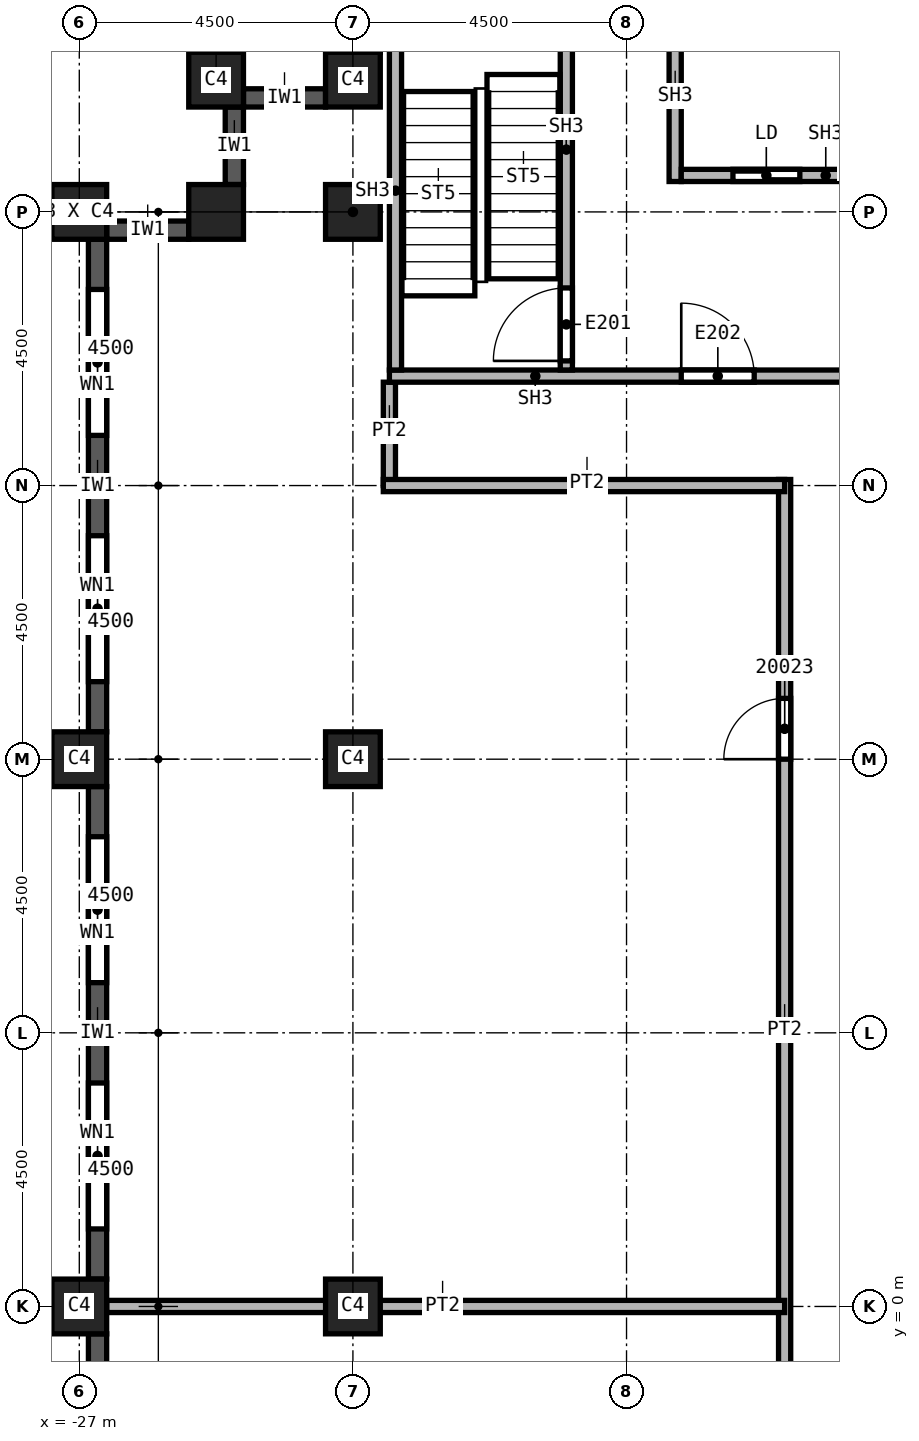
"""IFC4 building model, lengths in metres.
Left out: names, types, materials, properties, quantities, classifications, styles, units other than length and angle.
Written with IfcOpenShell. Run it as: python <this file> out.ifc"""

import sys

from ifc_helpers import new_model, si_unit, direction, frame, frame_2d, origin, origin_2d, place, context, subcontext, project, spatial, rectangle, extrude, element, fill, save


model = new_model("IFC4")
c1 = context("Model", 3, precision=1e-05, world=origin(), true_north=direction((0.0, 1.0)))
c2 = subcontext(c1, "Body", "Model", "MODEL_VIEW")
j1 = project(units=[si_unit("LENGTHUNIT", "METRE"), si_unit("PLANEANGLEUNIT", "RADIAN")], contexts=[c1])
p1 = place(None, origin())
s1 = spatial("IfcSite", under=j1, at=p1, CompositionType="ELEMENT")
p2 = place(p1, origin())
s2 = spatial("IfcBuilding", under=s1, at=p2, CompositionType="ELEMENT")
p3 = place(p2, frame((0.0, 0.0, 286.0)))
s3 = spatial("IfcBuildingStorey", under=s2, at=p3, CompositionType="ELEMENT", Elevation=286.0)
for number, where, z_axis, x_axis in (
    (1, (-22.5, 0.0, 0.0), (0.0, 0.0, 1.0), (1.0, 0.0, 0.0)),
    (2, (-22.5, 9.0, 0.0), (0.0, 0.0, 1.0), (1.0, 0.0, 0.0)),
    (3, (-22.5, 18.0, 0.0), (0.0, 0.0, 1.0), (1.0, 0.0, 0.0)),
    (4, (-27.0, 0.0, 0.0), (0.0, 0.0, 1.0), (0.0, 1.0, 0.0)),
    (5, (-27.0, 9.0, 0.0), (0.0, 0.0, 1.0), (0.0, 1.0, 0.0)),
    (6, (-27.0, 18.0, 0.0), (0.0, 0.0, 1.0), (0.0, 1.0, 0.0)),
    (7, (-22.5, 20.175, 0.0), (0.0, 0.0, 1.0), (1.0, 0.0, 0.0)),
    (8, (-24.75, 20.175, 0.0), (0.0, 0.0, 1.0), (1.0, 0.0, 0.0)),
    (9, (-24.75, 18.0, 0.0), (0.0, 0.0, 1.0), (1.0, 0.0, 0.0)),
):
    element("IfcColumn", number, at=place(p3, frame(where, z_axis=z_axis, x_axis=x_axis)), inside=s3, PredefinedType="COLUMN", context=c2, shape_type="SweptSolid", body=[
        extrude(rectangle(XDim=0.9, YDim=0.9, at=origin_2d()), origin(), (0.0, 0.0, 1.0), 3.72),
    ])
p4 = place(p3, frame((-24.45, 19.725, 0.0), z_axis=(0.0, 0.0, 1.0), x_axis=(0.0, -1.0, 0.0)))
e10 = element("IfcWall", 10, at=p4, inside=s3, PredefinedType="SOLIDWALL", context=c2, shape_type="SweptSolid", body=[
    extrude(rectangle(XDim=1.275, YDim=0.3, at=frame_2d((0.638, 0.0))), origin(), (0.0, 0.0, 1.0), 3.12),
])
p5 = place(p3, frame((-25.2, 17.7, 0.0), z_axis=(0.0, 0.0, 1.0), x_axis=(-1.0, 0.0, 0.0)))
e11 = element("IfcWall", 11, at=p5, inside=s3, PredefinedType="SOLIDWALL", context=c2, shape_type="SweptSolid", body=[
    extrude(rectangle(XDim=1.35, YDim=0.3, at=frame_2d((0.675, 0.0))), origin(), (0.0, 0.0, 1.0), 3.12),
])
p6 = place(p3, frame((-26.7, 17.55, 0.0), z_axis=(0.0, 0.0, 1.0), x_axis=(0.0, -1.0, 0.0)))
e12 = element("IfcWall", 12, at=p6, inside=s3, PredefinedType="SOLIDWALL", context=c2, shape_type="SweptSolid", body=[
    extrude(rectangle(XDim=8.1, YDim=0.3, at=frame_2d((4.05, 0.0))), origin(), (0.0, 0.0, 1.0), 3.12),
])
p7 = place(p6, frame((0.825, 0.0, 0.8)))
e13 = element("IfcOpeningElement", 13, at=p7, cuts=e12, PredefinedType="OPENING", context=c2, shape_type="SweptSolid", body=[
    extrude(rectangle(XDim=2.4, YDim=1.95, at=frame_2d((1.2, 0.975))), frame((0.0, 0.15, 0.0), z_axis=(0.0, -1.0, 0.0), x_axis=(1.0, 0.0, 0.0)), (0.0, 0.0, 1.0), 0.3),
])
p8 = place(p6, frame((4.875, 0.0, 0.8)))
e14 = element("IfcOpeningElement", 14, at=p8, cuts=e12, PredefinedType="OPENING", context=c2, shape_type="SweptSolid", body=[
    extrude(rectangle(XDim=2.4, YDim=1.95, at=frame_2d((1.2, 0.975))), frame((0.0, 0.15, 0.0), z_axis=(0.0, -1.0, 0.0), x_axis=(1.0, 0.0, 0.0)), (0.0, 0.0, 1.0), 0.3),
])
p9 = place(p3, frame((-26.7, 8.55, 0.0), z_axis=(0.0, 0.0, 1.0), x_axis=(0.0, -1.0, 0.0)))
e15 = element("IfcWall", 15, at=p9, inside=s3, PredefinedType="SOLIDWALL", context=c2, shape_type="SweptSolid", body=[
    extrude(rectangle(XDim=8.1, YDim=0.3, at=frame_2d((4.05, 0.0))), origin(), (0.0, 0.0, 1.0), 3.12),
])
p10 = place(p9, frame((0.825, 0.0, 0.8)))
e16 = element("IfcOpeningElement", 16, at=p10, cuts=e15, PredefinedType="OPENING", context=c2, shape_type="SweptSolid", body=[
    extrude(rectangle(XDim=2.4, YDim=1.95, at=frame_2d((1.2, 0.975))), frame((0.0, 0.15, 0.0), z_axis=(0.0, -1.0, 0.0), x_axis=(1.0, 0.0, 0.0)), (0.0, 0.0, 1.0), 0.3),
])
p11 = place(p9, frame((4.875, 0.0, 0.8)))
e17 = element("IfcOpeningElement", 17, at=p11, cuts=e15, PredefinedType="OPENING", context=c2, shape_type="SweptSolid", body=[
    extrude(rectangle(XDim=2.4, YDim=1.95, at=frame_2d((1.2, 0.975))), frame((0.0, 0.15, 0.0), z_axis=(0.0, -1.0, 0.0), x_axis=(1.0, 0.0, 0.0)), (0.0, 0.0, 1.0), 0.3),
])
p12 = place(p3, frame((-26.7, -0.45, 0.0), z_axis=(0.0, 0.0, 1.0), x_axis=(0.0, -1.0, 0.0)))
e18 = element("IfcWall", 18, at=p12, inside=s3, PredefinedType="SOLIDWALL", context=c2, shape_type="SweptSolid", body=[
    extrude(rectangle(XDim=8.1, YDim=0.3, at=frame_2d((4.05, 0.0))), origin(), (0.0, 0.0, 1.0), 3.12),
])
p13 = place(p12, frame((0.825, 0.0, 0.8)))
e19 = element("IfcOpeningElement", 19, at=p13, cuts=e18, PredefinedType="OPENING", context=c2, shape_type="SweptSolid", body=[
    extrude(rectangle(XDim=2.4, YDim=1.95, at=frame_2d((1.2, 0.975))), frame((0.0, 0.15, 0.0), z_axis=(0.0, -1.0, 0.0), x_axis=(1.0, 0.0, 0.0)), (0.0, 0.0, 1.0), 0.3),
])
p14 = place(p12, frame((4.875, 0.0, 0.8)))
e20 = element("IfcOpeningElement", 20, at=p14, cuts=e18, PredefinedType="OPENING", context=c2, shape_type="SweptSolid", body=[
    extrude(rectangle(XDim=2.4, YDim=1.95, at=frame_2d((1.2, 0.975))), frame((0.0, 0.15, 0.0), z_axis=(0.0, -1.0, 0.0), x_axis=(1.0, 0.0, 0.0)), (0.0, 0.0, 1.0), 0.3),
])
p15 = place(p3, frame((-22.95, 19.875, 0.0), z_axis=(0.0, 0.0, 1.0), x_axis=(-1.0, 0.0, 0.0)))
e21 = element("IfcWall", 21, at=p15, inside=s3, PredefinedType="SOLIDWALL", context=c2, shape_type="SweptSolid", body=[
    extrude(rectangle(XDim=1.35, YDim=0.3, at=frame_2d((0.675, 0.0))), origin(), (0.0, 0.0, 1.0), 3.12),
])
p16 = place(p3, frame((-21.9, 13.5, 0.0), z_axis=(0.0, 0.0, 1.0), x_axis=(0.0, 1.0, 0.0)))
e22 = element("IfcWall", 22, at=p16, inside=s3, PredefinedType="PARTITIONING", context=c2, shape_type="SweptSolid", body=[
    extrude(rectangle(XDim=1.7, YDim=0.2, at=frame_2d((0.85, 0.0))), origin(), (0.0, 0.0, 1.0), 3.72),
])
p17 = place(p3, frame((-15.4, -21.9, 0.0), z_axis=(0.0, 0.0, 1.0), x_axis=(0.0, 1.0, 0.0)))
e23 = element("IfcWall", 23, at=p17, inside=s3, PredefinedType="PARTITIONING", context=c2, shape_type="SweptSolid", body=[
    extrude(rectangle(XDim=35.5, YDim=0.2, at=frame_2d((17.75, 0.0))), origin(), (0.0, 0.0, 1.0), 3.72),
])
p18 = place(p17, frame((30.9, 0.0, 0.0)))
e24 = element("IfcOpeningElement", 24, at=p18, cuts=e23, PredefinedType="OPENING", context=c2, shape_type="SweptSolid", body=[
    extrude(rectangle(XDim=1.0, YDim=2.1, at=frame_2d((0.5, 1.05))), frame((0.0, 0.1, 0.0), z_axis=(0.0, -1.0, 0.0), x_axis=(1.0, 0.0, 0.0)), (0.0, 0.0, 1.0), 0.2),
])
p19 = place(p17, frame((2.65, 0.0, 0.0)))
e25 = element("IfcOpeningElement", 25, at=p19, cuts=e23, PredefinedType="OPENING", context=c2, shape_type="SweptSolid", body=[
    extrude(rectangle(XDim=1.0, YDim=2.1, at=frame_2d((0.5, 1.05))), frame((0.0, 0.1, 0.0), z_axis=(0.0, -1.0, 0.0), x_axis=(1.0, 0.0, 0.0)), (0.0, 0.0, 1.0), 0.2),
])
p20 = place(p17, frame((7.65, 0.0, 0.0)))
e26 = element("IfcOpeningElement", 26, at=p20, cuts=e23, PredefinedType="OPENING", context=c2, shape_type="SweptSolid", body=[
    extrude(rectangle(XDim=1.0, YDim=2.1, at=frame_2d((0.5, 1.05))), frame((0.0, 0.1, 0.0), z_axis=(0.0, -1.0, 0.0), x_axis=(1.0, 0.0, 0.0)), (0.0, 0.0, 1.0), 0.2),
])
p21 = place(p17, frame((14.7, 0.0, 0.0)))
e27 = element("IfcOpeningElement", 27, at=p21, cuts=e23, PredefinedType="OPENING", context=c2, shape_type="SweptSolid", body=[
    extrude(rectangle(XDim=1.0, YDim=2.1, at=frame_2d((0.5, 1.05))), frame((0.0, 0.1, 0.0), z_axis=(0.0, -1.0, 0.0), x_axis=(1.0, 0.0, 0.0)), (0.0, 0.0, 1.0), 0.2),
])
p22 = place(p17, frame((18.3, 0.0, 0.0)))
e28 = element("IfcOpeningElement", 28, at=p22, cuts=e23, PredefinedType="OPENING", context=c2, shape_type="SweptSolid", body=[
    extrude(rectangle(XDim=1.0, YDim=2.1, at=frame_2d((0.5, 1.05))), frame((0.0, 0.1, 0.0), z_axis=(0.0, -1.0, 0.0), x_axis=(1.0, 0.0, 0.0)), (0.0, 0.0, 1.0), 0.2),
])
p23 = place(p3, frame((-15.4, 0.0, 0.0), z_axis=(0.0, 0.0, 1.0), x_axis=(-1.0, 0.0, 0.0)))
e29 = element("IfcWall", 29, at=p23, inside=s3, PredefinedType="PARTITIONING", context=c2, shape_type="SweptSolid", body=[
    extrude(rectangle(XDim=11.15, YDim=0.2, at=frame_2d((5.575, 0.0))), origin(), (0.0, 0.0, 1.0), 3.72),
])
p24 = place(p3, frame((-15.4, 13.5, 0.0), z_axis=(0.0, 0.0, 1.0), x_axis=(-1.0, 0.0, 0.0)))
e30 = element("IfcWall", 30, at=p24, inside=s3, PredefinedType="PARTITIONING", context=c2, shape_type="SweptSolid", body=[
    extrude(rectangle(XDim=6.6, YDim=0.2, at=frame_2d((3.3, 0.0))), origin(), (0.0, 0.0, 1.0), 3.72),
])
p25 = place(p3, frame((-21.9, 15.3, 0.0), z_axis=(0.0, 0.0, 1.0), x_axis=(1.0, 0.0, 0.0)))
e31 = element("IfcWall", 31, at=p25, inside=s3, PredefinedType="SOLIDWALL", context=c2, shape_type="SweptSolid", body=[
    extrude(rectangle(XDim=8.275, YDim=0.2, at=frame_2d((4.137, 0.0))), origin(), (0.0, 0.0, 1.0), 3.72),
])
p26 = place(p25, frame((4.8, 0.0, 0.0)))
e32 = element("IfcOpeningElement", 32, at=p26, cuts=e31, PredefinedType="OPENING", context=c2, shape_type="SweptSolid", body=[
    extrude(rectangle(XDim=1.2, YDim=2.1, at=frame_2d((0.6, 1.05))), frame((0.0, 0.1, 0.0), z_axis=(0.0, -1.0, 0.0), x_axis=(1.0, 0.0, 0.0)), (0.0, 0.0, 1.0), 0.2),
])
p27 = place(p3, frame((-21.8, 15.4, 0.0), z_axis=(0.0, 0.0, 1.0), x_axis=(0.0, 1.0, 0.0)))
e33 = element("IfcWall", 33, at=p27, inside=s3, PredefinedType="SOLIDWALL", context=c2, shape_type="SweptSolid", body=[
    extrude(rectangle(XDim=5.9, YDim=0.2, at=frame_2d((2.95, 0.0))), origin(), (0.0, 0.0, 1.0), 3.72),
])
p28 = place(p3, frame((-18.99, 15.4, 0.0), z_axis=(0.0, 0.0, 1.0), x_axis=(0.0, 1.0, 0.0)))
e34 = element("IfcWall", 34, at=p28, inside=s3, PredefinedType="SOLIDWALL", context=c2, shape_type="SweptSolid", body=[
    extrude(rectangle(XDim=5.9, YDim=0.2, at=frame_2d((2.95, 0.0))), origin(), (0.0, 0.0, 1.0), 3.72),
])
p29 = place(p28, frame((0.15, 0.0, 0.0)))
e35 = element("IfcOpeningElement", 35, at=p29, cuts=e34, PredefinedType="OPENING", context=c2, shape_type="SweptSolid", body=[
    extrude(rectangle(XDim=1.2, YDim=2.1, at=frame_2d((0.6, 1.05))), frame((0.0, 0.1, 0.0), z_axis=(0.0, -1.0, 0.0), x_axis=(1.0, 0.0, 0.0)), (0.0, 0.0, 1.0), 0.2),
])
p30 = place(p3, frame((-17.2, 18.5, 0.0), z_axis=(0.0, 0.0, 1.0), x_axis=(0.0, 1.0, 0.0)))
e36 = element("IfcWall", 36, at=p30, inside=s3, PredefinedType="SOLIDWALL", context=c2, shape_type="SweptSolid", body=[
    extrude(rectangle(XDim=2.8, YDim=0.2, at=frame_2d((1.4, 0.0))), origin(), (0.0, 0.0, 1.0), 3.72),
])
p31 = place(p3, frame((-17.1, 18.6, 0.0), z_axis=(0.0, 0.0, 1.0), x_axis=(1.0, 0.0, 0.0)))
e37 = element("IfcWall", 37, at=p31, inside=s3, PredefinedType="SOLIDWALL", context=c2, shape_type="SweptSolid", body=[
    extrude(rectangle(XDim=2.8, YDim=0.2, at=frame_2d((1.4, 0.0))), origin(), (0.0, 0.0, 1.0), 3.72),
])
p32 = place(p31, frame((0.85, 0.0, 0.0)))
e38 = element("IfcOpeningElement", 38, at=p32, cuts=e37, PredefinedType="OPENING", context=c2, shape_type="SweptSolid", body=[
    extrude(rectangle(XDim=1.1, YDim=2.1, at=frame_2d((0.55, 1.05))), frame((0.0, 0.1, 0.0), z_axis=(0.0, -1.0, 0.0), x_axis=(1.0, 0.0, 0.0)), (0.0, 0.0, 1.0), 0.2),
])
p33 = place(p7, origin())
e39 = element("IfcWindow", 39, at=p33, inside=s3, PartitioningType="SINGLE_PANEL", PredefinedType="WINDOW", context=c2, shape_type="SweptSolid", body=[
    extrude(rectangle(XDim=2.4, YDim=1.95, at=frame_2d((1.2, 0.975))), frame((0.0, 0.03, 0.0), z_axis=(0.0, -1.0, 0.0), x_axis=(1.0, 0.0, 0.0)), (0.0, 0.0, 1.0), 0.06),
])
fill(e13, e39)
p34 = place(p8, origin())
e40 = element("IfcWindow", 40, at=p34, inside=s3, PartitioningType="SINGLE_PANEL", PredefinedType="WINDOW", context=c2, shape_type="SweptSolid", body=[
    extrude(rectangle(XDim=2.4, YDim=1.95, at=frame_2d((1.2, 0.975))), frame((0.0, 0.03, 0.0), z_axis=(0.0, -1.0, 0.0), x_axis=(1.0, 0.0, 0.0)), (0.0, 0.0, 1.0), 0.06),
])
fill(e14, e40)
p35 = place(p10, origin())
e41 = element("IfcWindow", 41, at=p35, inside=s3, PartitioningType="SINGLE_PANEL", PredefinedType="WINDOW", context=c2, shape_type="SweptSolid", body=[
    extrude(rectangle(XDim=2.4, YDim=1.95, at=frame_2d((1.2, 0.975))), frame((0.0, 0.03, 0.0), z_axis=(0.0, -1.0, 0.0), x_axis=(1.0, 0.0, 0.0)), (0.0, 0.0, 1.0), 0.06),
])
fill(e16, e41)
p36 = place(p11, origin())
e42 = element("IfcWindow", 42, at=p36, inside=s3, PartitioningType="SINGLE_PANEL", PredefinedType="WINDOW", context=c2, shape_type="SweptSolid", body=[
    extrude(rectangle(XDim=2.4, YDim=1.95, at=frame_2d((1.2, 0.975))), frame((0.0, 0.03, 0.0), z_axis=(0.0, -1.0, 0.0), x_axis=(1.0, 0.0, 0.0)), (0.0, 0.0, 1.0), 0.06),
])
fill(e17, e42)
p37 = place(p18, origin())
e43 = element("IfcDoor", 43, at=p37, inside=s3, OperationType="SINGLE_SWING_RIGHT", PredefinedType="DOOR", context=c2, shape_type="SweptSolid", body=[
    extrude(rectangle(XDim=1.0, YDim=2.1, at=frame_2d((0.5, 1.05))), frame((0.0, 0.025, 0.0), z_axis=(0.0, -1.0, 0.0), x_axis=(1.0, 0.0, 0.0)), (0.0, 0.0, 1.0), 0.05),
])
fill(e24, e43)
p38 = place(p29, origin())
e44 = element("IfcDoor", 44, at=p38, inside=s3, OperationType="SINGLE_SWING_LEFT", PredefinedType="DOOR", context=c2, shape_type="SweptSolid", body=[
    extrude(rectangle(XDim=1.2, YDim=2.1, at=frame_2d((0.6, 1.05))), frame((0.0, 0.025, 0.0), z_axis=(0.0, -1.0, 0.0), x_axis=(1.0, 0.0, 0.0)), (0.0, 0.0, 1.0), 0.05),
])
fill(e35, e44)
p39 = place(p32, origin())
e45 = element("IfcDoor", 45, at=p39, inside=s3, OperationType="SLIDING_TO_LEFT", PredefinedType="DOOR", context=c2, shape_type="SweptSolid", body=[
    extrude(rectangle(XDim=1.1, YDim=2.1, at=frame_2d((0.55, 1.05))), frame((0.0, 0.025, 0.0), z_axis=(0.0, -1.0, 0.0), x_axis=(1.0, 0.0, 0.0)), (0.0, 0.0, 1.0), 0.05),
])
fill(e38, e45)
p40 = place(p26, origin())
e46 = element("IfcDoor", 46, at=p40, inside=s3, OperationType="SINGLE_SWING_RIGHT", PredefinedType="DOOR", context=c2, shape_type="SweptSolid", body=[
    extrude(rectangle(XDim=1.2, YDim=2.1, at=frame_2d((0.6, 1.05))), frame((0.0, 0.025, 0.0), z_axis=(0.0, -1.0, 0.0), x_axis=(1.0, 0.0, 0.0)), (0.0, 0.0, 1.0), 0.05),
])
fill(e32, e46)
save(model, sys.argv[1])
